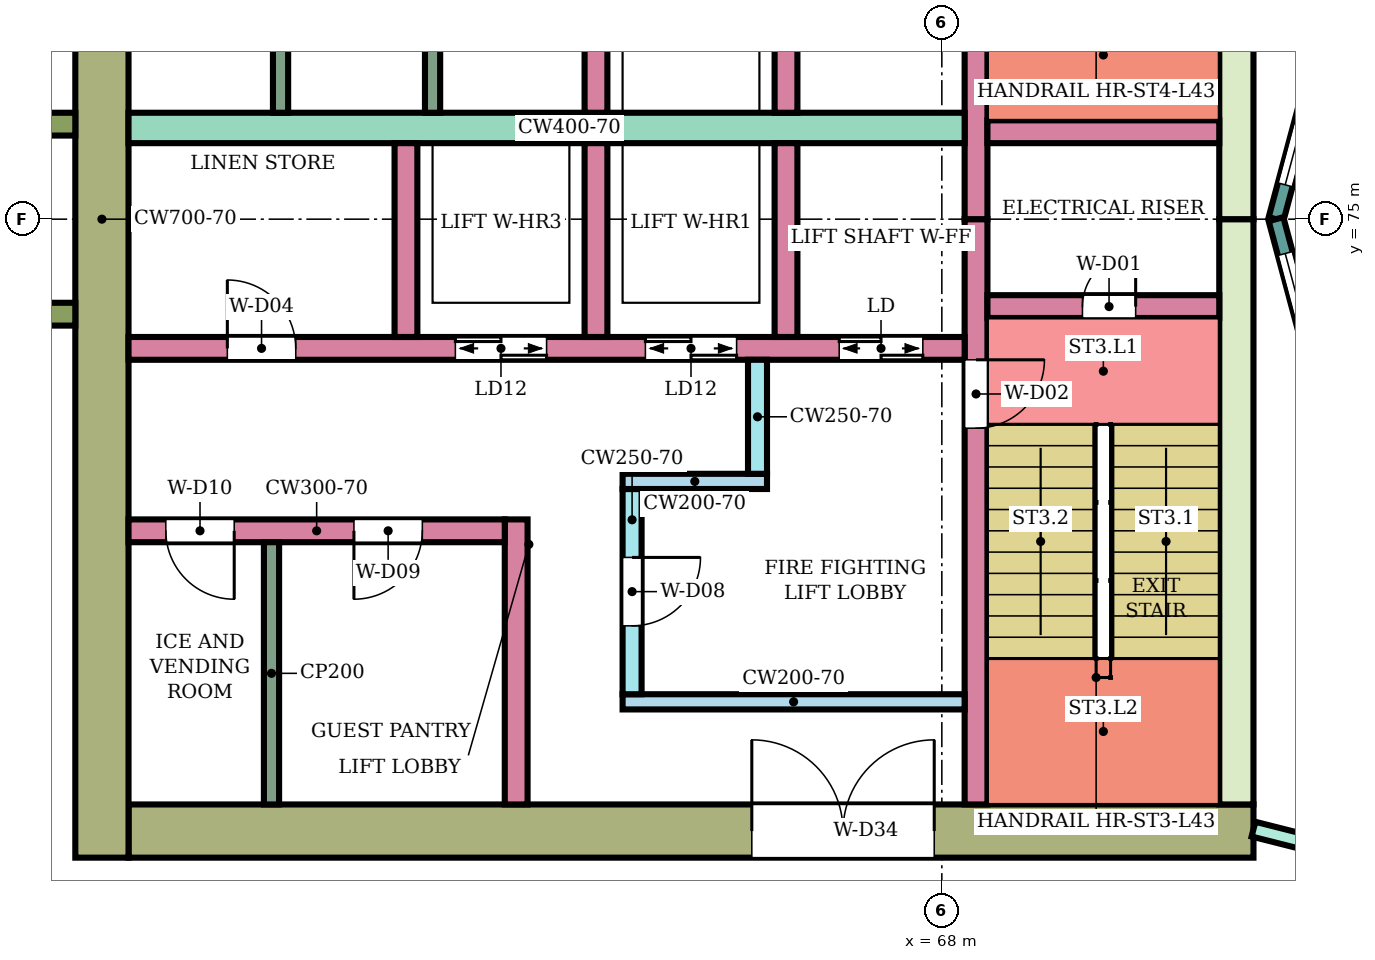
"""IFC4 building model, lengths in metres.
Left out: names, types, materials, properties, quantities, classifications, styles, units other than length and angle.
Written with IfcOpenShell. Run it as: python <this file> out.ifc"""

import sys

from ifc_helpers import new_model, si_unit, direction, frame, frame_2d, origin, place, context, subcontext, project, spatial, rectangle, extrude, element, fill, save


model = new_model("IFC4")
c1 = context("Model", 3, precision=1e-05, world=origin(), true_north=direction((0.0, 1.0)))
c2 = subcontext(c1, "Body", "Model", "MODEL_VIEW")
j1 = project(units=[si_unit("LENGTHUNIT", "METRE"), si_unit("PLANEANGLEUNIT", "RADIAN")], contexts=[c1])
p1 = place(None, origin())
s1 = spatial("IfcSite", under=j1, at=p1, CompositionType="ELEMENT")
p2 = place(p1, origin())
s2 = spatial("IfcBuilding", under=s1, at=p2, CompositionType="ELEMENT")
p3 = place(p2, frame((0.0, 0.0, 186.4)))
s3 = spatial("IfcBuildingStorey", under=s2, at=p3, CompositionType="ELEMENT", Elevation=186.4)
p4 = place(p3, frame((72.1, 66.95, 0.0), z_axis=(0.0, 0.0, 1.0), x_axis=(-1.0, 0.0, 0.0)))
e1 = element("IfcWall", 1, at=p4, inside=s3, PredefinedType="SHEAR", context=c2, shape_type="SweptSolid", body=[
    extrude(rectangle(XDim=14.8, YDim=0.7, at=frame_2d((7.4, 0.0))), origin(), (0.0, 0.0, 1.0), 3.78),
])
p5 = place(p4, frame((4.2, 0.0, 0.0)))
e2 = element("IfcOpeningElement", 2, at=p5, cuts=e1, PredefinedType="OPENING", context=c2, shape_type="SweptSolid", body=[
    extrude(rectangle(XDim=2.4, YDim=2.4, at=frame_2d((1.2, 1.2))), frame((0.0, 0.36, 0.0), z_axis=(0.0, -1.0, 0.0), x_axis=(1.0, 0.0, 0.0)), (0.0, 0.0, 1.0), 0.72),
])
for number, where, z_axis, x_axis in (
    (3, (71.875, 75.0, 0.0), (0.0, 0.0, 1.0), (0.0, -1.0, 0.0)),
    (4, (71.875, 82.7, 0.0), (0.0, 0.0, 1.0), (0.0, -1.0, 0.0)),
):
    element("IfcWall", number, at=place(p3, frame(where, z_axis=z_axis, x_axis=x_axis)), inside=s3, PredefinedType="SHEAR", context=c2, shape_type="SweptSolid", body=[
        extrude(rectangle(XDim=7.7, YDim=0.45, at=frame_2d((3.85, 0.0))), origin(), (0.0, 0.0, 1.0), 3.78),
    ])
p6 = place(p3, frame((56.95, 83.4, 0.0), z_axis=(0.0, 0.0, 1.0), x_axis=(0.0, -1.0, 0.0)))
e5 = element("IfcWall", 5, at=p6, inside=s3, PredefinedType="SHEAR", context=c2, shape_type="SweptSolid", body=[
    extrude(rectangle(XDim=16.8, YDim=0.7, at=frame_2d((8.4, 0.0))), origin(), (0.0, 0.0, 1.0), 3.78),
])
p7 = place(p3, frame((68.45, 75.0, 0.0), z_axis=(0.0, 0.0, 1.0), x_axis=(0.0, -1.0, 0.0)))
e6 = element("IfcWall", 6, at=p7, inside=s3, PredefinedType="SHEAR", context=c2, shape_type="SweptSolid", body=[
    extrude(rectangle(XDim=7.7, YDim=0.3, at=frame_2d((3.85, 0.0))), origin(), (0.0, 0.0, 1.0), 3.78),
])
p8 = place(p7, frame((1.85, 0.0, 0.0)))
e7 = element("IfcOpeningElement", 7, at=p8, cuts=e6, PredefinedType="OPENING", context=c2, shape_type="SweptSolid", body=[
    extrude(rectangle(XDim=0.9, YDim=2.1, at=frame_2d((0.45, 1.05))), frame((0.0, 0.16, 0.0), z_axis=(0.0, -1.0, 0.0), x_axis=(1.0, 0.0, 0.0)), (0.0, 0.0, 1.0), 0.32),
])
p9 = place(p3, frame((68.45, 82.7, 0.0), z_axis=(0.0, 0.0, 1.0), x_axis=(0.0, -1.0, 0.0)))
e8 = element("IfcWall", 8, at=p9, inside=s3, PredefinedType="SHEAR", context=c2, shape_type="SweptSolid", body=[
    extrude(rectangle(XDim=7.7, YDim=0.3, at=frame_2d((3.85, 0.0))), origin(), (0.0, 0.0, 1.0), 3.78),
])
p10 = place(p9, frame((0.35, 0.0, 0.0)))
e9 = element("IfcOpeningElement", 9, at=p10, cuts=e8, PredefinedType="OPENING", context=c2, shape_type="SweptSolid", body=[
    extrude(rectangle(XDim=0.9, YDim=2.1, at=frame_2d((0.45, 1.05))), frame((0.0, 0.16, 0.0), z_axis=(0.0, -1.0, 0.0), x_axis=(1.0, 0.0, 0.0)), (0.0, 0.0, 1.0), 0.32),
])
p11 = place(p3, frame((71.65, 73.85, 0.0), z_axis=(0.0, 0.0, 1.0), x_axis=(-1.0, 0.0, 0.0)))
e10 = element("IfcWall", 10, at=p11, inside=s3, PredefinedType="SHEAR", context=c2, shape_type="SweptSolid", body=[
    extrude(rectangle(XDim=3.05, YDim=0.3, at=frame_2d((1.525, 0.0))), origin(), (0.0, 0.0, 1.0), 3.78),
])
p12 = place(p11, frame((1.1, 0.0, 0.0)))
e11 = element("IfcOpeningElement", 11, at=p12, cuts=e10, PredefinedType="OPENING", context=c2, shape_type="SweptSolid", body=[
    extrude(rectangle(XDim=0.7, YDim=2.0, at=frame_2d((0.35, 1.0))), frame((0.0, 0.16, 0.0), z_axis=(0.0, -1.0, 0.0), x_axis=(1.0, 0.0, 0.0)), (0.0, 0.0, 1.0), 0.32),
])
p13 = place(p3, frame((71.65, 76.15, 0.0), z_axis=(0.0, 0.0, 1.0), x_axis=(-1.0, 0.0, 0.0)))
e12 = element("IfcWall", 12, at=p13, inside=s3, PredefinedType="SHEAR", context=c2, shape_type="SweptSolid", body=[
    extrude(rectangle(XDim=3.05, YDim=0.3, at=frame_2d((1.525, 0.0))), origin(), (0.0, 0.0, 1.0), 3.78),
])
p14 = place(p3, frame((68.3, 73.3, 0.0), z_axis=(0.0, 0.0, 1.0), x_axis=(-1.0, 0.0, 0.0)))
e13 = element("IfcWall", 13, at=p14, inside=s3, PredefinedType="SHEAR", context=c2, shape_type="SweptSolid", body=[
    extrude(rectangle(XDim=11.0, YDim=0.3, at=frame_2d((5.5, 0.0))), origin(), (0.0, 0.0, 1.0), 3.78),
])
p15 = place(p14, frame((0.55, 0.0, 0.0)))
e14 = element("IfcOpeningElement", 14, at=p15, cuts=e13, PredefinedType="OPENING", context=c2, shape_type="SweptSolid", body=[
    extrude(rectangle(XDim=1.1, YDim=2.1, at=frame_2d((0.55, 1.05))), frame((0.0, 0.16, 0.0), z_axis=(0.0, -1.0, 0.0), x_axis=(1.0, 0.0, 0.0)), (0.0, 0.0, 1.0), 0.32),
])
p16 = place(p14, frame((3.0, 0.0, 0.0)))
e15 = element("IfcOpeningElement", 15, at=p16, cuts=e13, PredefinedType="OPENING", context=c2, shape_type="SweptSolid", body=[
    extrude(rectangle(XDim=1.2, YDim=2.1, at=frame_2d((0.6, 1.05))), frame((0.0, 0.16, 0.0), z_axis=(0.0, -1.0, 0.0), x_axis=(1.0, 0.0, 0.0)), (0.0, 0.0, 1.0), 0.32),
])
p17 = place(p14, frame((5.5, 0.0, 0.0)))
e16 = element("IfcOpeningElement", 16, at=p17, cuts=e13, PredefinedType="OPENING", context=c2, shape_type="SweptSolid", body=[
    extrude(rectangle(XDim=1.2, YDim=2.1, at=frame_2d((0.6, 1.05))), frame((0.0, 0.16, 0.0), z_axis=(0.0, -1.0, 0.0), x_axis=(1.0, 0.0, 0.0)), (0.0, 0.0, 1.0), 0.32),
])
p18 = place(p14, frame((8.8, 0.0, 0.0)))
e17 = element("IfcOpeningElement", 17, at=p18, cuts=e13, PredefinedType="OPENING", context=c2, shape_type="SweptSolid", body=[
    extrude(rectangle(XDim=0.9, YDim=2.1, at=frame_2d((0.45, 1.05))), frame((0.0, 0.16, 0.0), z_axis=(0.0, -1.0, 0.0), x_axis=(1.0, 0.0, 0.0)), (0.0, 0.0, 1.0), 0.32),
])
p19 = place(p3, frame((68.3, 76.2, 0.0), z_axis=(0.0, 0.0, 1.0), x_axis=(-1.0, 0.0, 0.0)))
e18 = element("IfcWall", 18, at=p19, inside=s3, PredefinedType="SHEAR", context=c2, shape_type="SweptSolid", body=[
    extrude(rectangle(XDim=11.0, YDim=0.4, at=frame_2d((5.5, 0.0))), origin(), (0.0, 0.0, 1.0), 3.78),
])
for number, where, z_axis, x_axis in (
    (19, (65.95, 76.0, 0.0), (0.0, 0.0, 1.0), (0.0, -1.0, 0.0)),
    (20, (63.45, 76.0, 0.0), (0.0, 0.0, 1.0), (0.0, -1.0, 0.0)),
    (21, (60.95, 76.0, 0.0), (0.0, 0.0, 1.0), (0.0, -1.0, 0.0)),
    (22, (65.95, 78.95, 0.0), (0.0, 0.0, 1.0), (0.0, -1.0, 0.0)),
    (23, (63.45, 78.95, 0.0), (0.0, 0.0, 1.0), (0.0, -1.0, 0.0)),
):
    element("IfcWall", number, at=place(p3, frame(where, z_axis=z_axis, x_axis=x_axis)), inside=s3, PredefinedType="SHEAR", context=c2, shape_type="SweptSolid", body=[
        extrude(rectangle(XDim=2.55, YDim=0.3, at=frame_2d((1.275, 0.0))), origin(), (0.0, 0.0, 1.0), 3.78),
    ])
p20 = place(p3, frame((68.3, 68.65, 0.0), z_axis=(0.0, 0.0, 1.0), x_axis=(-1.0, 0.0, 0.0)))
e24 = element("IfcWall", 24, at=p20, inside=s3, PredefinedType="SHEAR", context=c2, shape_type="SweptSolid", body=[
    extrude(rectangle(XDim=4.5, YDim=0.2, at=frame_2d((2.25, 0.0))), origin(), (0.0, 0.0, 1.0), 3.78),
])
p21 = place(p3, frame((63.925, 71.45, 0.0), z_axis=(0.0, 0.0, 1.0), x_axis=(0.0, -1.0, 0.0)))
e25 = element("IfcWall", 25, at=p21, inside=s3, PredefinedType="SHEAR", context=c2, shape_type="SweptSolid", body=[
    extrude(rectangle(XDim=2.7, YDim=0.25, at=frame_2d((1.35, 0.0))), origin(), (0.0, 0.0, 1.0), 3.78),
])
p22 = place(p21, frame((0.9, 0.0, 0.0)))
e26 = element("IfcOpeningElement", 26, at=p22, cuts=e25, PredefinedType="OPENING", context=c2, shape_type="SweptSolid", body=[
    extrude(rectangle(XDim=0.9, YDim=2.1, at=frame_2d((0.45, 1.05))), frame((0.0, 0.135, 0.0), z_axis=(0.0, -1.0, 0.0), x_axis=(1.0, 0.0, 0.0)), (0.0, 0.0, 1.0), 0.27),
])
p23 = place(p3, frame((65.7, 71.55, 0.0), z_axis=(0.0, 0.0, 1.0), x_axis=(-1.0, 0.0, 0.0)))
e27 = element("IfcWall", 27, at=p23, inside=s3, PredefinedType="SHEAR", context=c2, shape_type="SweptSolid", body=[
    extrude(rectangle(XDim=1.9, YDim=0.2, at=frame_2d((0.95, 0.0))), origin(), (0.0, 0.0, 1.0), 3.78),
])
p24 = place(p3, frame((65.575, 73.15, 0.0), z_axis=(0.0, 0.0, 1.0), x_axis=(0.0, -1.0, 0.0)))
e28 = element("IfcWall", 28, at=p24, inside=s3, PredefinedType="SHEAR", context=c2, shape_type="SweptSolid", body=[
    extrude(rectangle(XDim=1.5, YDim=0.25, at=frame_2d((0.75, 0.0))), origin(), (0.0, 0.0, 1.0), 3.78),
])
p25 = place(p3, frame((62.4, 71.05, 0.0), z_axis=(0.0, 0.0, 1.0), x_axis=(0.0, -1.0, 0.0)))
e29 = element("IfcWall", 29, at=p25, inside=s3, PredefinedType="SHEAR", context=c2, shape_type="SweptSolid", body=[
    extrude(rectangle(XDim=3.75, YDim=0.3, at=frame_2d((1.875, 0.0))), origin(), (0.0, 0.0, 1.0), 3.78),
])
p26 = place(p3, frame((62.25, 70.9, 0.0), z_axis=(0.0, 0.0, 1.0), x_axis=(-1.0, 0.0, 0.0)))
e30 = element("IfcWall", 30, at=p26, inside=s3, PredefinedType="SHEAR", context=c2, shape_type="SweptSolid", body=[
    extrude(rectangle(XDim=4.95, YDim=0.3, at=frame_2d((2.475, 0.0))), origin(), (0.0, 0.0, 1.0), 3.78),
])
p27 = place(p26, frame((1.084, 0.0, 0.0)))
e31 = element("IfcOpeningElement", 31, at=p27, cuts=e30, PredefinedType="OPENING", context=c2, shape_type="SweptSolid", body=[
    extrude(rectangle(XDim=0.9, YDim=2.1, at=frame_2d((0.45, 1.05))), frame((0.0, 0.16, 0.0), z_axis=(0.0, -1.0, 0.0), x_axis=(1.0, 0.0, 0.0)), (0.0, 0.0, 1.0), 0.32),
])
p28 = place(p26, frame((3.56, 0.0, 0.0)))
e32 = element("IfcOpeningElement", 32, at=p28, cuts=e30, PredefinedType="OPENING", context=c2, shape_type="SweptSolid", body=[
    extrude(rectangle(XDim=0.9, YDim=2.1, at=frame_2d((0.45, 1.05))), frame((0.0, 0.16, 0.0), z_axis=(0.0, -1.0, 0.0), x_axis=(1.0, 0.0, 0.0)), (0.0, 0.0, 1.0), 0.32),
])
for number, where, z_axis, x_axis in (
    (33, (56.6, 76.25, 0.0), (0.0, 0.0, 1.0), (-1.0, 0.0, 0.0)),
    (34, (56.6, 73.75, 0.0), (0.0, 0.0, 1.0), (-1.0, 0.0, 0.0)),
):
    element("IfcWall", number, at=place(p3, frame(where, z_axis=z_axis, x_axis=x_axis)), inside=s3, PredefinedType="NOTDEFINED", context=c2, shape_type="SweptSolid", body=[
        extrude(rectangle(XDim=2.416, YDim=0.3, at=frame_2d((1.208, 0.0))), origin(), (0.0, 0.0, 1.0), 4.1),
    ])
p29 = place(p3, frame((73.415, 78.802, 0.0), z_axis=(0.0, 0.0, 1.0), x_axis=(-0.258789828301, -0.965933654434, 0.0)))
e35 = element("IfcWall", 35, at=p29, inside=s3, PredefinedType="NOTDEFINED", context=c2, shape_type="SweptSolid", body=[
    extrude(rectangle(XDim=3.936, YDim=0.2, at=frame_2d((1.968, 0.0))), origin(), (0.0, 0.0, 1.0), 4.1),
])
p30 = place(p29, frame((0.468, 0.0, 0.9)))
e36 = element("IfcOpeningElement", 36, at=p30, cuts=e35, PredefinedType="OPENING", context=c2, shape_type="SweptSolid", body=[
    extrude(rectangle(XDim=3.0, YDim=2.3, at=frame_2d((1.5, 1.15))), frame((0.0, 0.11, 0.0), z_axis=(0.0, -1.0, 0.0), x_axis=(1.0, 0.0, 0.0)), (0.0, 0.0, 1.0), 0.22),
])
p31 = place(p3, frame((72.396, 75.0, 0.0), z_axis=(0.0, 0.0, 1.0), x_axis=(0.258789828301, -0.965933654434, 0.0)))
e37 = element("IfcWall", 37, at=p31, inside=s3, PredefinedType="NOTDEFINED", context=c2, shape_type="SweptSolid", body=[
    extrude(rectangle(XDim=3.936, YDim=0.2, at=frame_2d((1.968, 0.0))), origin(), (0.0, 0.0, 1.0), 4.1),
])
p32 = place(p31, frame((0.468, 0.0, 0.9)))
e38 = element("IfcOpeningElement", 38, at=p32, cuts=e37, PredefinedType="OPENING", context=c2, shape_type="SweptSolid", body=[
    extrude(rectangle(XDim=3.0, YDim=2.3, at=frame_2d((1.5, 1.15))), frame((0.0, 0.11, 0.0), z_axis=(0.0, -1.0, 0.0), x_axis=(1.0, 0.0, 0.0)), (0.0, 0.0, 1.0), 0.22),
])
p33 = place(p3, frame((72.1, 66.975, 0.0), z_axis=(0.0, 0.0, 1.0), x_axis=(0.969471314457, -0.245204752086, 0.0)))
e39 = element("IfcWall", 39, at=p33, inside=s3, PredefinedType="PARTITIONING", context=c2, shape_type="SweptSolid", body=[
    extrude(rectangle(XDim=2.582, YDim=0.2, at=frame_2d((1.291, 0.0))), origin(), (0.0, 0.0, 1.0), 3.65),
])
p34 = place(p33, frame((0.841, 0.0, 0.0)))
e40 = element("IfcOpeningElement", 40, at=p34, cuts=e39, PredefinedType="OPENING", context=c2, shape_type="SweptSolid", body=[
    extrude(rectangle(XDim=0.9, YDim=2.1, at=frame_2d((0.45, 1.05))), frame((0.0, 0.11, 0.0), z_axis=(0.0, -1.0, 0.0), x_axis=(1.0, 0.0, 0.0)), (0.0, 0.0, 1.0), 0.22),
])
for number, where, z_axis, x_axis in (
    (41, (61.3, 78.95, 0.0), (0.0, 0.0, 1.0), (0.0, -1.0, 0.0)),
    (42, (59.3, 78.95, 0.0), (0.0, 0.0, 1.0), (0.0, -1.0, 0.0)),
):
    element("IfcWall", number, at=place(p3, frame(where, z_axis=z_axis, x_axis=x_axis)), inside=s3, PredefinedType="PARTITIONING", context=c2, shape_type="SweptSolid", body=[
        extrude(rectangle(XDim=2.55, YDim=0.2, at=frame_2d((1.275, 0.0))), origin(), (0.0, 0.0, 1.0), 3.78),
    ])
p35 = place(p3, frame((59.181, 70.75, 0.0), z_axis=(0.0, 0.0, 1.0), x_axis=(0.0, -1.0, 0.0)))
e43 = element("IfcWall", 43, at=p35, inside=s3, PredefinedType="PARTITIONING", context=c2, shape_type="SweptSolid", body=[
    extrude(rectangle(XDim=3.45, YDim=0.2, at=frame_2d((1.725, 0.0))), origin(), (0.0, 0.0, 1.0), 3.78),
])
p36 = place(p30, origin())
e44 = element("IfcWindow", 44, at=p36, inside=s3, PartitioningType="SINGLE_PANEL", PredefinedType="WINDOW", context=c2, shape_type="SweptSolid", body=[
    extrude(rectangle(XDim=3.0, YDim=2.3, at=frame_2d((1.5, 1.15))), frame((0.0, 0.03, 0.0), z_axis=(0.0, -1.0, 0.0), x_axis=(1.0, 0.0, 0.0)), (0.0, 0.0, 1.0), 0.06),
])
fill(e36, e44)
p37 = place(p32, origin())
e45 = element("IfcWindow", 45, at=p37, inside=s3, PartitioningType="SINGLE_PANEL", PredefinedType="WINDOW", context=c2, shape_type="SweptSolid", body=[
    extrude(rectangle(XDim=3.0, YDim=2.3, at=frame_2d((1.5, 1.15))), frame((0.0, 0.03, 0.0), z_axis=(0.0, -1.0, 0.0), x_axis=(1.0, 0.0, 0.0)), (0.0, 0.0, 1.0), 0.06),
])
fill(e38, e45)
p38 = place(p12, frame((0.7, 0.0, 0.0), z_axis=(0.0, 0.0, 1.0), x_axis=(-1.0, 0.0, 0.0)))
e46 = element("IfcDoor", 46, at=p38, inside=s3, OperationType="SINGLE_SWING_RIGHT", PredefinedType="DOOR", context=c2, shape_type="SweptSolid", body=[
    extrude(rectangle(XDim=0.7, YDim=2.0, at=frame_2d((0.35, 1.0))), frame((0.0, 0.025, 0.0), z_axis=(0.0, -1.0, 0.0), x_axis=(1.0, 0.0, 0.0)), (0.0, 0.0, 1.0), 0.05),
])
fill(e11, e46)
p39 = place(p8, origin())
e47 = element("IfcDoor", 47, at=p39, inside=s3, OperationType="SINGLE_SWING_LEFT", PredefinedType="DOOR", context=c2, shape_type="SweptSolid", body=[
    extrude(rectangle(XDim=0.9, YDim=2.1, at=frame_2d((0.45, 1.05))), frame((0.0, 0.025, 0.0), z_axis=(0.0, -1.0, 0.0), x_axis=(1.0, 0.0, 0.0)), (0.0, 0.0, 1.0), 0.05),
])
fill(e7, e47)
p40 = place(p15, origin())
e48 = element("IfcDoor", 48, at=p40, inside=s3, OperationType="DOUBLE_DOOR_SLIDING", PredefinedType="DOOR", context=c2, shape_type="SweptSolid", body=[
    extrude(rectangle(XDim=1.1, YDim=2.1, at=frame_2d((0.55, 1.05))), frame((0.0, 0.025, 0.0), z_axis=(0.0, -1.0, 0.0), x_axis=(1.0, 0.0, 0.0)), (0.0, 0.0, 1.0), 0.05),
])
fill(e14, e48)
p41 = place(p16, origin())
e49 = element("IfcDoor", 49, at=p41, inside=s3, OperationType="DOUBLE_DOOR_SLIDING", PredefinedType="DOOR", context=c2, shape_type="SweptSolid", body=[
    extrude(rectangle(XDim=1.2, YDim=2.1, at=frame_2d((0.6, 1.05))), frame((0.0, 0.025, 0.0), z_axis=(0.0, -1.0, 0.0), x_axis=(1.0, 0.0, 0.0)), (0.0, 0.0, 1.0), 0.05),
])
fill(e15, e49)
p42 = place(p17, origin())
e50 = element("IfcDoor", 50, at=p42, inside=s3, OperationType="DOUBLE_DOOR_SLIDING", PredefinedType="DOOR", context=c2, shape_type="SweptSolid", body=[
    extrude(rectangle(XDim=1.2, YDim=2.1, at=frame_2d((0.6, 1.05))), frame((0.0, 0.025, 0.0), z_axis=(0.0, -1.0, 0.0), x_axis=(1.0, 0.0, 0.0)), (0.0, 0.0, 1.0), 0.05),
])
fill(e16, e50)
p43 = place(p18, frame((0.9, 0.0, 0.0), z_axis=(0.0, 0.0, 1.0), x_axis=(-1.0, 0.0, 0.0)))
e51 = element("IfcDoor", 51, at=p43, inside=s3, OperationType="SINGLE_SWING_LEFT", PredefinedType="DOOR", context=c2, shape_type="SweptSolid", body=[
    extrude(rectangle(XDim=0.9, YDim=2.1, at=frame_2d((0.45, 1.05))), frame((0.0, 0.025, 0.0), z_axis=(0.0, -1.0, 0.0), x_axis=(1.0, 0.0, 0.0)), (0.0, 0.0, 1.0), 0.05),
])
fill(e17, e51)
p44 = place(p22, origin())
e52 = element("IfcDoor", 52, at=p44, inside=s3, OperationType="SINGLE_SWING_LEFT", PredefinedType="DOOR", context=c2, shape_type="SweptSolid", body=[
    extrude(rectangle(XDim=0.9, YDim=2.1, at=frame_2d((0.45, 1.05))), frame((0.0, 0.025, 0.0), z_axis=(0.0, -1.0, 0.0), x_axis=(1.0, 0.0, 0.0)), (0.0, 0.0, 1.0), 0.05),
])
fill(e26, e52)
p45 = place(p27, origin())
e53 = element("IfcDoor", 53, at=p45, inside=s3, OperationType="SINGLE_SWING_RIGHT", PredefinedType="DOOR", context=c2, shape_type="SweptSolid", body=[
    extrude(rectangle(XDim=0.9, YDim=2.1, at=frame_2d((0.45, 1.05))), frame((0.0, 0.025, 0.0), z_axis=(0.0, -1.0, 0.0), x_axis=(1.0, 0.0, 0.0)), (0.0, 0.0, 1.0), 0.05),
])
fill(e31, e53)
p46 = place(p28, origin())
e54 = element("IfcDoor", 54, at=p46, inside=s3, OperationType="SINGLE_SWING_LEFT", PredefinedType="DOOR", context=c2, shape_type="SweptSolid", body=[
    extrude(rectangle(XDim=0.9, YDim=2.1, at=frame_2d((0.45, 1.05))), frame((0.0, 0.025, 0.0), z_axis=(0.0, -1.0, 0.0), x_axis=(1.0, 0.0, 0.0)), (0.0, 0.0, 1.0), 0.05),
])
fill(e32, e54)
p47 = place(p5, frame((2.4, 0.0, 0.0), z_axis=(0.0, 0.0, 1.0), x_axis=(-1.0, 0.0, 0.0)))
e55 = element("IfcDoor", 55, at=p47, inside=s3, OperationType="DOUBLE_DOOR_SINGLE_SWING", PredefinedType="DOOR", context=c2, shape_type="SweptSolid", body=[
    extrude(rectangle(XDim=2.4, YDim=2.4, at=frame_2d((1.2, 1.2))), frame((0.0, 0.025, 0.0), z_axis=(0.0, -1.0, 0.0), x_axis=(1.0, 0.0, 0.0)), (0.0, 0.0, 1.0), 0.05),
])
fill(e2, e55)
save(model, sys.argv[1])
